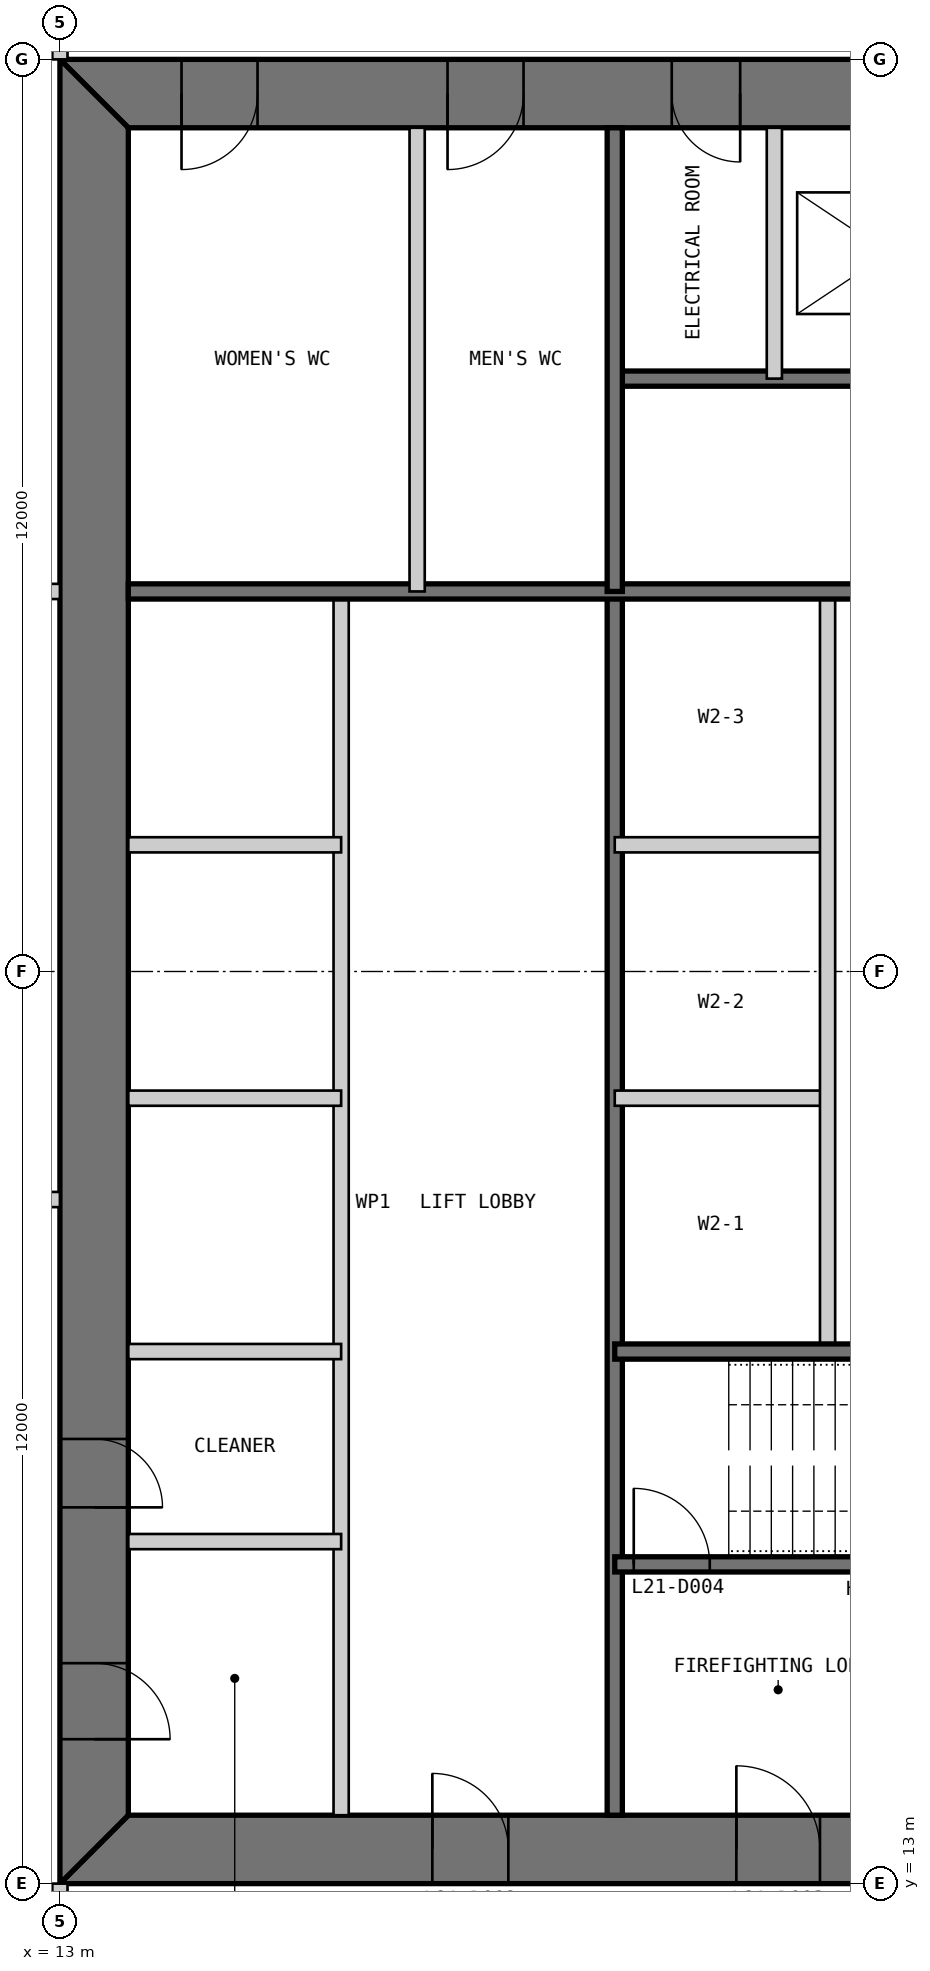
"""IFC4 building model, lengths in metres.
Left out: names, types, materials, properties, quantities, classifications, styles, units other than length and angle.
Written with IfcOpenShell. Run it as: python <this file> out.ifc"""

import sys

from ifc_helpers import new_model, si_unit, direction, frame, frame_2d, origin, place, context, subcontext, project, spatial, polyline, rectangle, outline, extrude, element, fill, save


model = new_model("IFC4")
c1 = context("Model", 3, precision=1e-05, world=origin(), true_north=direction((0.0, 1.0)))
c2 = subcontext(c1, "Body", "Model", "MODEL_VIEW")
j1 = project(units=[si_unit("LENGTHUNIT", "METRE"), si_unit("PLANEANGLEUNIT", "RADIAN")], contexts=[c1])
p1 = place(None, origin())
s1 = spatial("IfcSite", under=j1, at=p1, CompositionType="ELEMENT")
p2 = place(p1, origin())
s2 = spatial("IfcBuilding", under=s1, at=p2, CompositionType="ELEMENT")
p3 = place(p2, frame((0.0, 0.0, 91.0)))
s3 = spatial("IfcBuildingStorey", under=s2, at=p3, CompositionType="ELEMENT", Elevation=91.0)
p4 = place(p3, frame((13.0, 13.45, 0.0), z_axis=(0.0, 0.0, 1.0), x_axis=(1.0, 0.0, 0.0)))
e1 = element("IfcWall", 1, at=p4, inside=s3, PredefinedType="SHEAR", context=c2, shape_type="SweptSolid", body=[
    extrude(outline(polyline([(0.0, -0.45), (24.0, -0.45), (23.1, 0.45), (0.9, 0.45), (0.0, -0.45)])), origin(), (0.0, 0.0, 1.0), 6.0),
])
p5 = place(p4, frame((4.9, 0.0, 0.0)))
e2 = element("IfcOpeningElement", 2, at=p5, cuts=e1, PredefinedType="OPENING", context=c2, shape_type="SweptSolid", body=[
    extrude(rectangle(XDim=1.0, YDim=2.2, at=frame_2d((0.5, 1.1))), frame((0.0, 0.46, 0.0), z_axis=(0.0, -1.0, 0.0), x_axis=(1.0, 0.0, 0.0)), (0.0, 0.0, 1.0), 0.92),
])
p6 = place(p4, frame((8.9, 0.0, 0.0)))
e3 = element("IfcOpeningElement", 3, at=p6, cuts=e1, PredefinedType="OPENING", context=c2, shape_type="SweptSolid", body=[
    extrude(rectangle(XDim=1.1, YDim=2.2, at=frame_2d((0.55, 1.1))), frame((0.0, 0.46, 0.0), z_axis=(0.0, -1.0, 0.0), x_axis=(1.0, 0.0, 0.0)), (0.0, 0.0, 1.0), 0.92),
])
p7 = place(p4, frame((15.05, 0.0, 0.0)))
e4 = element("IfcOpeningElement", 4, at=p7, cuts=e1, PredefinedType="OPENING", context=c2, shape_type="SweptSolid", body=[
    extrude(rectangle(XDim=0.9, YDim=2.2, at=frame_2d((0.45, 1.1))), frame((0.0, 0.46, 0.0), z_axis=(0.0, -1.0, 0.0), x_axis=(1.0, 0.0, 0.0)), (0.0, 0.0, 1.0), 0.92),
])
p8 = place(p4, frame((17.9, 0.0, 0.0)))
e5 = element("IfcOpeningElement", 5, at=p8, cuts=e1, PredefinedType="OPENING", context=c2, shape_type="SweptSolid", body=[
    extrude(rectangle(XDim=1.0, YDim=2.2, at=frame_2d((0.5, 1.1))), frame((0.0, 0.46, 0.0), z_axis=(0.0, -1.0, 0.0), x_axis=(1.0, 0.0, 0.0)), (0.0, 0.0, 1.0), 0.92),
])
p9 = place(p4, frame((21.4, 0.0, 0.0)))
e6 = element("IfcOpeningElement", 6, at=p9, cuts=e1, PredefinedType="OPENING", context=c2, shape_type="SweptSolid", body=[
    extrude(rectangle(XDim=1.0, YDim=2.2, at=frame_2d((0.5, 1.1))), frame((0.0, 0.46, 0.0), z_axis=(0.0, -1.0, 0.0), x_axis=(1.0, 0.0, 0.0)), (0.0, 0.0, 1.0), 0.92),
])
p10 = place(p3, frame((37.0, 36.55, 0.0), z_axis=(0.0, 0.0, 1.0), x_axis=(-1.0, 0.0, 0.0)))
e7 = element("IfcWall", 7, at=p10, inside=s3, PredefinedType="SHEAR", context=c2, shape_type="SweptSolid", body=[
    extrude(outline(polyline([(0.0, -0.45), (24.0, -0.45), (23.1, 0.45), (0.9, 0.45), (0.0, -0.45)])), origin(), (0.0, 0.0, 1.0), 6.0),
])
p11 = place(p10, frame((4.9, 0.0, 0.0)))
e8 = element("IfcOpeningElement", 8, at=p11, cuts=e7, PredefinedType="OPENING", context=c2, shape_type="SweptSolid", body=[
    extrude(rectangle(XDim=1.0, YDim=2.2, at=frame_2d((0.5, 1.1))), frame((0.0, 0.46, 0.0), z_axis=(0.0, -1.0, 0.0), x_axis=(1.0, 0.0, 0.0)), (0.0, 0.0, 1.0), 0.92),
])
p12 = place(p10, frame((8.9, 0.0, 0.0)))
e9 = element("IfcOpeningElement", 9, at=p12, cuts=e7, PredefinedType="OPENING", context=c2, shape_type="SweptSolid", body=[
    extrude(rectangle(XDim=1.1, YDim=2.2, at=frame_2d((0.55, 1.1))), frame((0.0, 0.46, 0.0), z_axis=(0.0, -1.0, 0.0), x_axis=(1.0, 0.0, 0.0)), (0.0, 0.0, 1.0), 0.92),
])
p13 = place(p10, frame((15.05, 0.0, 0.0)))
e10 = element("IfcOpeningElement", 10, at=p13, cuts=e7, PredefinedType="OPENING", context=c2, shape_type="SweptSolid", body=[
    extrude(rectangle(XDim=0.9, YDim=2.2, at=frame_2d((0.45, 1.1))), frame((0.0, 0.46, 0.0), z_axis=(0.0, -1.0, 0.0), x_axis=(1.0, 0.0, 0.0)), (0.0, 0.0, 1.0), 0.92),
])
p14 = place(p10, frame((17.9, 0.0, 0.0)))
e11 = element("IfcOpeningElement", 11, at=p14, cuts=e7, PredefinedType="OPENING", context=c2, shape_type="SweptSolid", body=[
    extrude(rectangle(XDim=1.0, YDim=2.2, at=frame_2d((0.5, 1.1))), frame((0.0, 0.46, 0.0), z_axis=(0.0, -1.0, 0.0), x_axis=(1.0, 0.0, 0.0)), (0.0, 0.0, 1.0), 0.92),
])
p15 = place(p10, frame((21.4, 0.0, 0.0)))
e12 = element("IfcOpeningElement", 12, at=p15, cuts=e7, PredefinedType="OPENING", context=c2, shape_type="SweptSolid", body=[
    extrude(rectangle(XDim=1.0, YDim=2.2, at=frame_2d((0.5, 1.1))), frame((0.0, 0.46, 0.0), z_axis=(0.0, -1.0, 0.0), x_axis=(1.0, 0.0, 0.0)), (0.0, 0.0, 1.0), 0.92),
])
p16 = place(p3, frame((13.45, 36.1, 0.0), z_axis=(0.0, 0.0, 1.0), x_axis=(0.0, -1.0, 0.0)))
e13 = element("IfcWall", 13, at=p16, inside=s3, PredefinedType="SHEAR", context=c2, shape_type="SweptSolid", body=[
    extrude(outline(polyline([(-0.9, -0.45), (23.1, -0.45), (22.2, 0.45), (0.0, 0.45), (-0.9, -0.45)])), origin(), (0.0, 0.0, 1.0), 6.0),
])
p17 = place(p16, frame((20.2, 0.0, 0.0)))
e14 = element("IfcOpeningElement", 14, at=p17, cuts=e13, PredefinedType="OPENING", context=c2, shape_type="SweptSolid", body=[
    extrude(rectangle(XDim=1.0, YDim=2.2, at=frame_2d((0.5, 1.1))), frame((0.0, 0.46, 0.0), z_axis=(0.0, -1.0, 0.0), x_axis=(1.0, 0.0, 0.0)), (0.0, 0.0, 1.0), 0.92),
])
p18 = place(p16, frame((17.25, 0.0, 0.0)))
e15 = element("IfcOpeningElement", 15, at=p18, cuts=e13, PredefinedType="OPENING", context=c2, shape_type="SweptSolid", body=[
    extrude(rectangle(XDim=0.9, YDim=2.2, at=frame_2d((0.45, 1.1))), frame((0.0, 0.46, 0.0), z_axis=(0.0, -1.0, 0.0), x_axis=(1.0, 0.0, 0.0)), (0.0, 0.0, 1.0), 0.92),
])
p19 = place(p3, frame((16.7, 13.9, 0.0), z_axis=(0.0, 0.0, 1.0), x_axis=(0.0, 1.0, 0.0)))
e16 = element("IfcWall", 16, at=p19, inside=s3, PredefinedType="PARTITIONING", context=c2, shape_type="SweptSolid", body=[
    extrude(rectangle(XDim=16.1, YDim=0.2, at=frame_2d((8.05, 0.0))), origin(), (0.0, 0.0, 1.0), 5.8),
])
p20 = place(p3, frame((20.3, 13.9, 0.0), z_axis=(0.0, 0.0, 1.0), x_axis=(0.0, 1.0, 0.0)))
e17 = element("IfcWall", 17, at=p20, inside=s3, PredefinedType="SOLIDWALL", context=c2, shape_type="SweptSolid", body=[
    extrude(rectangle(XDim=16.1, YDim=0.2, at=frame_2d((8.05, 0.0))), origin(), (0.0, 0.0, 1.0), 5.8),
])
for number, where, z_axis, x_axis in (
    (18, (13.9, 20.0, 0.0), (0.0, 0.0, 1.0), (1.0, 0.0, 0.0)),
    (19, (13.9, 23.333, 0.0), (0.0, 0.0, 1.0), (1.0, 0.0, 0.0)),
    (20, (13.9, 26.667, 0.0), (0.0, 0.0, 1.0), (1.0, 0.0, 0.0)),
    (21, (20.3, 23.333, 0.0), (0.0, 0.0, 1.0), (1.0, 0.0, 0.0)),
    (22, (20.3, 26.667, 0.0), (0.0, 0.0, 1.0), (1.0, 0.0, 0.0)),
):
    element("IfcWall", number, at=place(p3, frame(where, z_axis=z_axis, x_axis=x_axis)), inside=s3, PredefinedType="PARTITIONING", context=c2, shape_type="SweptSolid", body=[
        extrude(rectangle(XDim=2.8, YDim=0.2, at=frame_2d((1.4, 0.0))), origin(), (0.0, 0.0, 1.0), 5.8),
    ])
p21 = place(p3, frame((23.1, 20.0, 0.0), z_axis=(0.0, 0.0, 1.0), x_axis=(0.0, 1.0, 0.0)))
e23 = element("IfcWall", 23, at=p21, inside=s3, PredefinedType="PARTITIONING", context=c2, shape_type="SweptSolid", body=[
    extrude(rectangle(XDim=10.0, YDim=0.2, at=frame_2d((5.0, 0.0))), origin(), (0.0, 0.0, 1.0), 5.8),
])
p22 = place(p3, frame((20.3, 17.2, 0.0), z_axis=(0.0, 0.0, 1.0), x_axis=(1.0, 0.0, 0.0)))
e24 = element("IfcWall", 24, at=p22, inside=s3, PredefinedType="SOLIDWALL", context=c2, shape_type="SweptSolid", body=[
    extrude(rectangle(XDim=9.4, YDim=0.2, at=frame_2d((4.7, 0.0))), origin(), (0.0, 0.0, 1.0), 5.8),
])
p23 = place(p22, frame((0.25, 0.0, 0.0)))
e25 = element("IfcOpeningElement", 25, at=p23, cuts=e24, PredefinedType="OPENING", context=c2, shape_type="SweptSolid", body=[
    extrude(rectangle(XDim=1.0, YDim=2.2, at=frame_2d((0.5, 1.1))), frame((0.0, 0.11, 0.0), z_axis=(0.0, -1.0, 0.0), x_axis=(1.0, 0.0, 0.0)), (0.0, 0.0, 1.0), 0.22),
])
p24 = place(p3, frame((20.3, 20.0, 0.0), z_axis=(0.0, 0.0, 1.0), x_axis=(1.0, 0.0, 0.0)))
e26 = element("IfcWall", 26, at=p24, inside=s3, PredefinedType="SOLIDWALL", context=c2, shape_type="SweptSolid", body=[
    extrude(rectangle(XDim=15.8, YDim=0.2, at=frame_2d((7.9, 0.0))), origin(), (0.0, 0.0, 1.0), 5.8),
])
p25 = place(p3, frame((13.9, 17.5, 0.0), z_axis=(0.0, 0.0, 1.0), x_axis=(1.0, 0.0, 0.0)))
e27 = element("IfcWall", 27, at=p25, inside=s3, PredefinedType="PARTITIONING", context=c2, shape_type="SweptSolid", body=[
    extrude(rectangle(XDim=2.8, YDim=0.2, at=frame_2d((1.4, 0.0))), origin(), (0.0, 0.0, 1.0), 5.8),
])
p26 = place(p3, frame((29.7, 32.8, 0.0), z_axis=(0.0, 0.0, 1.0), x_axis=(-1.0, 0.0, 0.0)))
e28 = element("IfcWall", 28, at=p26, inside=s3, PredefinedType="SOLIDWALL", context=c2, shape_type="SweptSolid", body=[
    extrude(rectangle(XDim=9.4, YDim=0.2, at=frame_2d((4.7, 0.0))), origin(), (0.0, 0.0, 1.0), 5.8),
])
p27 = place(p26, frame((0.25, 0.0, 0.0)))
e29 = element("IfcOpeningElement", 29, at=p27, cuts=e28, PredefinedType="OPENING", context=c2, shape_type="SweptSolid", body=[
    extrude(rectangle(XDim=1.0, YDim=2.2, at=frame_2d((0.5, 1.1))), frame((0.0, 0.11, 0.0), z_axis=(0.0, -1.0, 0.0), x_axis=(1.0, 0.0, 0.0)), (0.0, 0.0, 1.0), 0.22),
])
p28 = place(p3, frame((29.7, 30.0, 0.0), z_axis=(0.0, 0.0, 1.0), x_axis=(-1.0, 0.0, 0.0)))
e30 = element("IfcWall", 30, at=p28, inside=s3, PredefinedType="SOLIDWALL", context=c2, shape_type="SweptSolid", body=[
    extrude(rectangle(XDim=15.8, YDim=0.2, at=frame_2d((7.9, 0.0))), origin(), (0.0, 0.0, 1.0), 5.8),
])
p29 = place(p3, frame((22.4, 36.1, 0.0), z_axis=(0.0, 0.0, 1.0), x_axis=(0.0, -1.0, 0.0)))
e31 = element("IfcWall", 31, at=p29, inside=s3, PredefinedType="PARTITIONING", context=c2, shape_type="SweptSolid", body=[
    extrude(rectangle(XDim=3.3, YDim=0.2, at=frame_2d((1.65, 0.0))), origin(), (0.0, 0.0, 1.0), 5.8),
])
p30 = place(p3, frame((20.3, 36.1, 0.0), z_axis=(0.0, 0.0, 1.0), x_axis=(0.0, -1.0, 0.0)))
e32 = element("IfcWall", 32, at=p30, inside=s3, PredefinedType="SOLIDWALL", context=c2, shape_type="SweptSolid", body=[
    extrude(rectangle(XDim=6.1, YDim=0.2, at=frame_2d((3.05, 0.0))), origin(), (0.0, 0.0, 1.0), 5.8),
])
p31 = place(p3, frame((17.7, 36.1, 0.0), z_axis=(0.0, 0.0, 1.0), x_axis=(0.0, -1.0, 0.0)))
e33 = element("IfcWall", 33, at=p31, inside=s3, PredefinedType="PARTITIONING", context=c2, shape_type="SweptSolid", body=[
    extrude(rectangle(XDim=6.1, YDim=0.2, at=frame_2d((3.05, 0.0))), origin(), (0.0, 0.0, 1.0), 5.8),
])
p32 = place(p3, frame((13.0, 37.0, 0.0), z_axis=(0.0, 0.0, 1.0), x_axis=(0.0, 1.0, 0.0)))
e34 = element("IfcWall", 34, at=p32, inside=s3, PredefinedType="PARTITIONING", context=c2, shape_type="SweptSolid", body=[
    extrude(rectangle(XDim=9.0, YDim=0.2, at=frame_2d((4.5, 0.0))), origin(), (0.0, 0.0, 1.0), 4.853),
])
p33 = place(p3, frame((13.0, 10.6, 0.0), z_axis=(0.0, 0.0, 1.0), x_axis=(0.0, 1.0, 0.0)))
e35 = element("IfcWall", 35, at=p33, inside=s3, PredefinedType="PARTITIONING", context=c2, shape_type="SweptSolid", body=[
    extrude(rectangle(XDim=2.4, YDim=0.2, at=frame_2d((1.2, 0.0))), origin(), (0.0, 0.0, 1.0), 4.853),
])
p34 = place(p3, frame((2.0, 22.0, 0.0), z_axis=(0.0, 0.0, 1.0), x_axis=(1.0, 0.0, 0.0)))
e36 = element("IfcWall", 36, at=p34, inside=s3, PredefinedType="PARTITIONING", context=c2, shape_type="SweptSolid", body=[
    extrude(rectangle(XDim=11.0, YDim=0.2, at=frame_2d((5.5, 0.0))), origin(), (0.0, 0.0, 1.0), 5.8),
])
p35 = place(p34, frame((4.6, 0.0, 0.0)))
e37 = element("IfcOpeningElement", 37, at=p35, cuts=e36, PredefinedType="OPENING", context=c2, shape_type="SweptSolid", body=[
    extrude(rectangle(XDim=1.8, YDim=2.4, at=frame_2d((0.9, 1.2))), frame((0.0, 0.11, 0.0), z_axis=(0.0, -1.0, 0.0), x_axis=(1.0, 0.0, 0.0)), (0.0, 0.0, 1.0), 0.22),
])
p36 = place(p3, frame((2.0, 30.0, 0.0), z_axis=(0.0, 0.0, 1.0), x_axis=(1.0, 0.0, 0.0)))
e38 = element("IfcWall", 38, at=p36, inside=s3, PredefinedType="PARTITIONING", context=c2, shape_type="SweptSolid", body=[
    extrude(rectangle(XDim=11.0, YDim=0.2, at=frame_2d((5.5, 0.0))), origin(), (0.0, 0.0, 1.0), 5.8),
])
p37 = place(p36, frame((4.6, 0.0, 0.0)))
e39 = element("IfcOpeningElement", 39, at=p37, cuts=e38, PredefinedType="OPENING", context=c2, shape_type="SweptSolid", body=[
    extrude(rectangle(XDim=1.8, YDim=2.4, at=frame_2d((0.9, 1.2))), frame((0.0, 0.11, 0.0), z_axis=(0.0, -1.0, 0.0), x_axis=(1.0, 0.0, 0.0)), (0.0, 0.0, 1.0), 0.22),
])
p38 = place(p5, origin())
e40 = element("IfcDoor", 40, at=p38, inside=s3, OperationType="SINGLE_SWING_LEFT", PredefinedType="DOOR", context=c2, shape_type="SweptSolid", body=[
    extrude(rectangle(XDim=1.0, YDim=2.2, at=frame_2d((0.5, 1.1))), frame((0.0, 0.025, 0.0), z_axis=(0.0, -1.0, 0.0), x_axis=(1.0, 0.0, 0.0)), (0.0, 0.0, 1.0), 0.05),
    extrude(outline(polyline([(0.0, 0.0), (0.04, 0.0), (0.04, 2.16), (0.96, 2.16), (0.96, 0.0), (1.0, 0.0), (1.0, 2.2), (0.0, 2.2), (0.0, 0.0)])), frame((0.0, 0.3, 0.0), z_axis=(0.0, -1.0, 0.0), x_axis=(1.0, 0.0, 0.0)), (0.0, 0.0, 1.0), 0.6),
])
fill(e2, e40)
p39 = place(p6, origin())
e41 = element("IfcDoor", 41, at=p39, inside=s3, OperationType="SINGLE_SWING_LEFT", PredefinedType="DOOR", context=c2, shape_type="SweptSolid", body=[
    extrude(rectangle(XDim=1.1, YDim=2.2, at=frame_2d((0.55, 1.1))), frame((0.0, 0.025, 0.0), z_axis=(0.0, -1.0, 0.0), x_axis=(1.0, 0.0, 0.0)), (0.0, 0.0, 1.0), 0.05),
    extrude(outline(polyline([(0.0, 0.0), (0.04, 0.0), (0.04, 2.16), (1.06, 2.16), (1.06, 0.0), (1.1, 0.0), (1.1, 2.2), (0.0, 2.2), (0.0, 0.0)])), frame((0.0, 0.3, 0.0), z_axis=(0.0, -1.0, 0.0), x_axis=(1.0, 0.0, 0.0)), (0.0, 0.0, 1.0), 0.6),
])
fill(e3, e41)
p40 = place(p23, origin())
e42 = element("IfcDoor", 42, at=p40, inside=s3, OperationType="SINGLE_SWING_LEFT", PredefinedType="DOOR", context=c2, shape_type="SweptSolid", body=[
    extrude(rectangle(XDim=1.0, YDim=2.2, at=frame_2d((0.5, 1.1))), frame((0.0, 0.025, 0.0), z_axis=(0.0, -1.0, 0.0), x_axis=(1.0, 0.0, 0.0)), (0.0, 0.0, 1.0), 0.05),
])
fill(e25, e42)
p41 = place(p17, origin())
e43 = element("IfcDoor", 43, at=p41, inside=s3, OperationType="SINGLE_SWING_RIGHT", PredefinedType="DOOR", context=c2, shape_type="SweptSolid", body=[
    extrude(rectangle(XDim=1.0, YDim=2.2, at=frame_2d((0.5, 1.1))), frame((0.0, 0.025, 0.0), z_axis=(0.0, -1.0, 0.0), x_axis=(1.0, 0.0, 0.0)), (0.0, 0.0, 1.0), 0.05),
    extrude(outline(polyline([(0.0, 0.0), (0.04, 0.0), (0.04, 2.16), (0.96, 2.16), (0.96, 0.0), (1.0, 0.0), (1.0, 2.2), (0.0, 2.2), (0.0, 0.0)])), frame((0.0, 0.3, 0.0), z_axis=(0.0, -1.0, 0.0), x_axis=(1.0, 0.0, 0.0)), (0.0, 0.0, 1.0), 0.6),
])
fill(e14, e43)
p42 = place(p18, origin())
e44 = element("IfcDoor", 44, at=p42, inside=s3, OperationType="SINGLE_SWING_RIGHT", PredefinedType="DOOR", context=c2, shape_type="SweptSolid", body=[
    extrude(rectangle(XDim=0.9, YDim=2.2, at=frame_2d((0.45, 1.1))), frame((0.0, 0.025, 0.0), z_axis=(0.0, -1.0, 0.0), x_axis=(1.0, 0.0, 0.0)), (0.0, 0.0, 1.0), 0.05),
    extrude(outline(polyline([(0.0, 0.0), (0.04, 0.0), (0.04, 2.16), (0.86, 2.16), (0.86, 0.0), (0.9, 0.0), (0.9, 2.2), (0.0, 2.2), (0.0, 0.0)])), frame((0.0, 0.3, 0.0), z_axis=(0.0, -1.0, 0.0), x_axis=(1.0, 0.0, 0.0)), (0.0, 0.0, 1.0), 0.6),
])
fill(e15, e44)
p43 = place(p13, origin())
e45 = element("IfcDoor", 45, at=p43, inside=s3, OperationType="SINGLE_SWING_LEFT", PredefinedType="DOOR", context=c2, shape_type="SweptSolid", body=[
    extrude(rectangle(XDim=0.9, YDim=2.2, at=frame_2d((0.45, 1.1))), frame((0.0, 0.025, 0.0), z_axis=(0.0, -1.0, 0.0), x_axis=(1.0, 0.0, 0.0)), (0.0, 0.0, 1.0), 0.05),
    extrude(outline(polyline([(0.0, 0.0), (0.04, 0.0), (0.04, 2.16), (0.86, 2.16), (0.86, 0.0), (0.9, 0.0), (0.9, 2.2), (0.0, 2.2), (0.0, 0.0)])), frame((0.0, 0.3, 0.0), z_axis=(0.0, -1.0, 0.0), x_axis=(1.0, 0.0, 0.0)), (0.0, 0.0, 1.0), 0.6),
])
fill(e10, e45)
p44 = place(p14, origin())
e46 = element("IfcDoor", 46, at=p44, inside=s3, OperationType="SINGLE_SWING_RIGHT", PredefinedType="DOOR", context=c2, shape_type="SweptSolid", body=[
    extrude(rectangle(XDim=1.0, YDim=2.2, at=frame_2d((0.5, 1.1))), frame((0.0, 0.025, 0.0), z_axis=(0.0, -1.0, 0.0), x_axis=(1.0, 0.0, 0.0)), (0.0, 0.0, 1.0), 0.05),
    extrude(outline(polyline([(0.0, 0.0), (0.04, 0.0), (0.04, 2.16), (0.96, 2.16), (0.96, 0.0), (1.0, 0.0), (1.0, 2.2), (0.0, 2.2), (0.0, 0.0)])), frame((0.0, 0.3, 0.0), z_axis=(0.0, -1.0, 0.0), x_axis=(1.0, 0.0, 0.0)), (0.0, 0.0, 1.0), 0.6),
])
fill(e11, e46)
p45 = place(p15, origin())
e47 = element("IfcDoor", 47, at=p45, inside=s3, OperationType="SINGLE_SWING_RIGHT", PredefinedType="DOOR", context=c2, shape_type="SweptSolid", body=[
    extrude(rectangle(XDim=1.0, YDim=2.2, at=frame_2d((0.5, 1.1))), frame((0.0, 0.025, 0.0), z_axis=(0.0, -1.0, 0.0), x_axis=(1.0, 0.0, 0.0)), (0.0, 0.0, 1.0), 0.05),
    extrude(outline(polyline([(0.0, 0.0), (0.04, 0.0), (0.04, 2.16), (0.96, 2.16), (0.96, 0.0), (1.0, 0.0), (1.0, 2.2), (0.0, 2.2), (0.0, 0.0)])), frame((0.0, 0.3, 0.0), z_axis=(0.0, -1.0, 0.0), x_axis=(1.0, 0.0, 0.0)), (0.0, 0.0, 1.0), 0.6),
])
fill(e12, e47)
save(model, sys.argv[1])
